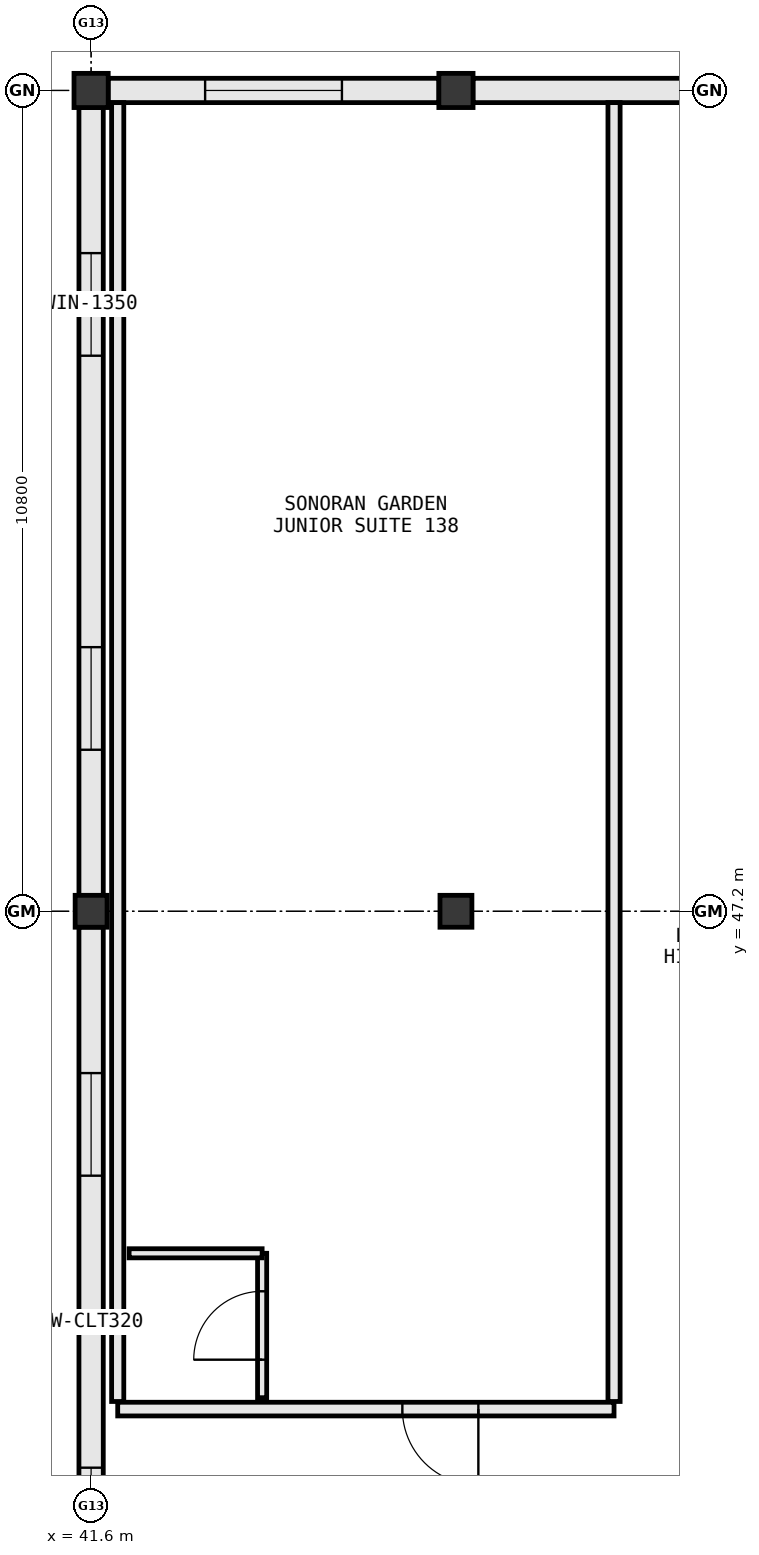
"""IFC4 building model, lengths in metres.
Left out: names, types, materials, properties, quantities, classifications, styles, units other than length and angle.
Written with IfcOpenShell. Run it as: python <this file> out.ifc"""

import sys

from ifc_helpers import new_model, si_unit, direction, frame, frame_2d, origin, origin_2d, place, context, subcontext, project, spatial, rectangle, extrude, element, fill, save


model = new_model("IFC4")
c1 = context("Model", 3, precision=1e-05, world=origin(), true_north=direction((0.0, 1.0)))
c2 = subcontext(c1, "Body", "Model", "MODEL_VIEW")
j1 = project(units=[si_unit("LENGTHUNIT", "METRE"), si_unit("PLANEANGLEUNIT", "RADIAN")], contexts=[c1])
p1 = place(None, origin())
s1 = spatial("IfcSite", under=j1, at=p1, CompositionType="ELEMENT")
p2 = place(p1, origin())
s2 = spatial("IfcBuilding", under=s1, at=p2, CompositionType="ELEMENT")
p3 = place(p2, frame((0.0, 0.0, 20.0)))
s3 = spatial("IfcBuildingStorey", under=s2, at=p3, CompositionType="ELEMENT", Elevation=20.0)
p4 = place(p3, frame((41.6, 58.0, 0.0), z_axis=(0.0, 0.0, 1.0), x_axis=(1.0, 0.0, 0.0)))
e1 = element("IfcColumn", 1, at=p4, inside=s3, PredefinedType="COLUMN", context=c2, shape_type="SweptSolid", body=[
    extrude(rectangle(XDim=0.45, YDim=0.45, at=origin_2d()), origin(), (0.0, 0.0, 1.0), 3.8),
])
for number, where, z_axis, x_axis in (
    (2, (41.6, 47.2, 0.0), (0.0, 0.0, 1.0), (1.0, 0.0, 0.0)),
    (3, (46.4, 47.2, 0.0), (0.0, 0.0, 1.0), (1.0, 0.0, 0.0)),
):
    element("IfcColumn", number, at=place(p3, frame(where, z_axis=z_axis, x_axis=x_axis)), inside=s3, PredefinedType="COLUMN", context=c2, shape_type="SweptSolid", body=[
        extrude(rectangle(XDim=0.42, YDim=0.42, at=origin_2d()), origin(), (0.0, 0.0, 1.0), 3.8),
    ])
p5 = place(p3, frame((46.4, 58.0, 0.0), z_axis=(0.0, 0.0, 1.0), x_axis=(1.0, 0.0, 0.0)))
e4 = element("IfcColumn", 4, at=p5, inside=s3, PredefinedType="COLUMN", context=c2, shape_type="SweptSolid", body=[
    extrude(rectangle(XDim=0.45, YDim=0.45, at=origin_2d()), origin(), (0.0, 0.0, 1.0), 3.8),
])
p6 = place(p3, frame((50.977, 58.0, 0.0), z_axis=(0.0, 0.0, 1.0), x_axis=(-1.0, 0.0, 0.0)))
e5 = element("IfcWall", 5, at=p6, inside=s3, PredefinedType="STANDARD", context=c2, shape_type="SweptSolid", body=[
    extrude(rectangle(XDim=4.354, YDim=0.32, at=frame_2d((2.177, 0.0))), origin(), (0.0, 0.0, 1.0), 2.865),
])
p7 = place(p3, frame((46.177, 58.0, 0.0), z_axis=(0.0, 0.0, 1.0), x_axis=(-1.0, 0.0, 0.0)))
e6 = element("IfcWall", 6, at=p7, inside=s3, PredefinedType="STANDARD", context=c2, shape_type="SweptSolid", body=[
    extrude(rectangle(XDim=4.354, YDim=0.32, at=frame_2d((2.177, 0.0))), origin(), (0.0, 0.0, 1.0), 2.865),
])
p8 = place(p7, frame((1.277, 0.0, 0.85)))
e7 = element("IfcOpeningElement", 7, at=p8, cuts=e6, PredefinedType="OPENING", context=c2, shape_type="SweptSolid", body=[
    extrude(rectangle(XDim=1.8, YDim=1.85, at=frame_2d((0.9, 0.925))), frame((0.0, 0.172, 0.0), z_axis=(0.0, -1.0, 0.0), x_axis=(1.0, 0.0, 0.0)), (0.0, 0.0, 1.0), 0.344),
])
p9 = place(p3, frame((41.6, 57.777, 0.0), z_axis=(0.0, 0.0, 1.0), x_axis=(0.0, -1.0, 0.0)))
e8 = element("IfcWall", 8, at=p9, inside=s3, PredefinedType="STANDARD", context=c2, shape_type="SweptSolid", body=[
    extrude(rectangle(XDim=10.369, YDim=0.32, at=frame_2d((5.185, 0.0))), origin(), (0.0, 0.0, 1.0), 2.905),
])
p10 = place(p9, frame((1.917, 0.0, 0.85)))
e9 = element("IfcOpeningElement", 9, at=p10, cuts=e8, PredefinedType="OPENING", context=c2, shape_type="SweptSolid", body=[
    extrude(rectangle(XDim=1.35, YDim=1.65, at=frame_2d((0.675, 0.825))), frame((0.0, 0.172, 0.0), z_axis=(0.0, -1.0, 0.0), x_axis=(1.0, 0.0, 0.0)), (0.0, 0.0, 1.0), 0.344),
])
p11 = place(p9, frame((7.102, 0.0, 0.85)))
e10 = element("IfcOpeningElement", 10, at=p11, cuts=e8, PredefinedType="OPENING", context=c2, shape_type="SweptSolid", body=[
    extrude(rectangle(XDim=1.35, YDim=1.65, at=frame_2d((0.675, 0.825))), frame((0.0, 0.172, 0.0), z_axis=(0.0, -1.0, 0.0), x_axis=(1.0, 0.0, 0.0)), (0.0, 0.0, 1.0), 0.344),
])
p12 = place(p3, frame((41.6, 46.992, 0.0), z_axis=(0.0, 0.0, 1.0), x_axis=(0.0, -1.0, 0.0)))
e11 = element("IfcWall", 11, at=p12, inside=s3, PredefinedType="STANDARD", context=c2, shape_type="SweptSolid", body=[
    extrude(rectangle(XDim=10.384, YDim=0.32, at=frame_2d((5.192, 0.0))), origin(), (0.0, 0.0, 1.0), 2.905),
])
p13 = place(p12, frame((1.921, 0.0, 0.85)))
e12 = element("IfcOpeningElement", 12, at=p13, cuts=e11, PredefinedType="OPENING", context=c2, shape_type="SweptSolid", body=[
    extrude(rectangle(XDim=1.35, YDim=1.65, at=frame_2d((0.675, 0.825))), frame((0.0, 0.172, 0.0), z_axis=(0.0, -1.0, 0.0), x_axis=(1.0, 0.0, 0.0)), (0.0, 0.0, 1.0), 0.344),
])
p14 = place(p12, frame((7.113, 0.0, 0.85)))
e13 = element("IfcOpeningElement", 13, at=p14, cuts=e11, PredefinedType="OPENING", context=c2, shape_type="SweptSolid", body=[
    extrude(rectangle(XDim=1.35, YDim=1.65, at=frame_2d((0.675, 0.825))), frame((0.0, 0.172, 0.0), z_axis=(0.0, -1.0, 0.0), x_axis=(1.0, 0.0, 0.0)), (0.0, 0.0, 1.0), 0.344),
])
p15 = place(p3, frame((41.95, 40.65, 0.0), z_axis=(0.0, 0.0, 1.0), x_axis=(1.0, 0.0, 0.0)))
e14 = element("IfcWall", 14, at=p15, inside=s3, PredefinedType="PARTITIONING", context=c2, shape_type="SweptSolid", body=[
    extrude(rectangle(XDim=6.53, YDim=0.18, at=frame_2d((3.265, 0.0))), origin(), (0.0, 0.0, 1.0), 3.55),
])
p16 = place(p15, frame((3.745, 0.0, 0.0)))
e15 = element("IfcOpeningElement", 15, at=p16, cuts=e14, PredefinedType="OPENING", context=c2, shape_type="SweptSolid", body=[
    extrude(rectangle(XDim=1.0, YDim=2.2, at=frame_2d((0.5, 1.1))), frame((0.0, 0.102, 0.0), z_axis=(0.0, -1.0, 0.0), x_axis=(1.0, 0.0, 0.0)), (0.0, 0.0, 1.0), 0.204),
])
p17 = place(p3, frame((41.95, 40.75, 0.0), z_axis=(0.0, 0.0, 1.0), x_axis=(0.0, 1.0, 0.0)))
e16 = element("IfcWall", 16, at=p17, inside=s3, PredefinedType="PARTITIONING", context=c2, shape_type="SweptSolid", body=[
    extrude(rectangle(XDim=17.09, YDim=0.16, at=frame_2d((8.545, 0.0))), origin(), (0.0, 0.0, 1.0), 2.905),
])
p18 = place(p3, frame((48.48, 40.75, 0.0), z_axis=(0.0, 0.0, 1.0), x_axis=(0.0, 1.0, 0.0)))
e17 = element("IfcWall", 17, at=p18, inside=s3, PredefinedType="PARTITIONING", context=c2, shape_type="SweptSolid", body=[
    extrude(rectangle(XDim=17.09, YDim=0.16, at=frame_2d((8.545, 0.0))), origin(), (0.0, 0.0, 1.0), 3.05),
])
p19 = place(p3, frame((43.85, 40.8, 0.0), z_axis=(0.0, 0.0, 1.0), x_axis=(0.0, 1.0, 0.0)))
e18 = element("IfcWall", 18, at=p19, inside=s3, PredefinedType="PARTITIONING", context=c2, shape_type="SweptSolid", body=[
    extrude(rectangle(XDim=1.9, YDim=0.12, at=frame_2d((0.95, 0.0))), origin(), (0.0, 0.0, 1.0), 3.05),
])
p20 = place(p19, frame((0.5, 0.0, 0.0)))
e19 = element("IfcOpeningElement", 19, at=p20, cuts=e18, PredefinedType="OPENING", context=c2, shape_type="SweptSolid", body=[
    extrude(rectangle(XDim=0.9, YDim=2.15, at=frame_2d((0.45, 1.075))), frame((0.0, 0.072, 0.0), z_axis=(0.0, -1.0, 0.0), x_axis=(1.0, 0.0, 0.0)), (0.0, 0.0, 1.0), 0.144),
])
p21 = place(p3, frame((42.1, 42.7, 0.0), z_axis=(0.0, 0.0, 1.0), x_axis=(1.0, 0.0, 0.0)))
e20 = element("IfcWall", 20, at=p21, inside=s3, PredefinedType="PARTITIONING", context=c2, shape_type="SweptSolid", body=[
    extrude(rectangle(XDim=1.75, YDim=0.12, at=frame_2d((0.875, 0.0))), origin(), (0.0, 0.0, 1.0), 3.55),
])
p22 = place(p8, origin())
e21 = element("IfcWindow", 21, at=p22, inside=s3, PartitioningType="SINGLE_PANEL", PredefinedType="WINDOW", context=c2, shape_type="SweptSolid", body=[
    extrude(rectangle(XDim=1.8, YDim=1.85, at=frame_2d((0.9, 0.925))), frame((0.0, 0.03, 0.0), z_axis=(0.0, -1.0, 0.0), x_axis=(1.0, 0.0, 0.0)), (0.0, 0.0, 1.0), 0.06),
])
fill(e7, e21)
p23 = place(p10, origin())
e22 = element("IfcWindow", 22, at=p23, inside=s3, PartitioningType="SINGLE_PANEL", PredefinedType="WINDOW", context=c2, shape_type="SweptSolid", body=[
    extrude(rectangle(XDim=1.35, YDim=1.65, at=frame_2d((0.675, 0.825))), frame((0.0, 0.03, 0.0), z_axis=(0.0, -1.0, 0.0), x_axis=(1.0, 0.0, 0.0)), (0.0, 0.0, 1.0), 0.06),
])
fill(e9, e22)
p24 = place(p11, origin())
e23 = element("IfcWindow", 23, at=p24, inside=s3, PartitioningType="SINGLE_PANEL", PredefinedType="WINDOW", context=c2, shape_type="SweptSolid", body=[
    extrude(rectangle(XDim=1.35, YDim=1.65, at=frame_2d((0.675, 0.825))), frame((0.0, 0.03, 0.0), z_axis=(0.0, -1.0, 0.0), x_axis=(1.0, 0.0, 0.0)), (0.0, 0.0, 1.0), 0.06),
])
fill(e10, e23)
p25 = place(p13, origin())
e24 = element("IfcWindow", 24, at=p25, inside=s3, PartitioningType="SINGLE_PANEL", PredefinedType="WINDOW", context=c2, shape_type="SweptSolid", body=[
    extrude(rectangle(XDim=1.35, YDim=1.65, at=frame_2d((0.675, 0.825))), frame((0.0, 0.03, 0.0), z_axis=(0.0, -1.0, 0.0), x_axis=(1.0, 0.0, 0.0)), (0.0, 0.0, 1.0), 0.06),
])
fill(e12, e24)
p26 = place(p14, origin())
e25 = element("IfcWindow", 25, at=p26, inside=s3, PartitioningType="SINGLE_PANEL", PredefinedType="WINDOW", context=c2, shape_type="SweptSolid", body=[
    extrude(rectangle(XDim=1.35, YDim=1.65, at=frame_2d((0.675, 0.825))), frame((0.0, 0.03, 0.0), z_axis=(0.0, -1.0, 0.0), x_axis=(1.0, 0.0, 0.0)), (0.0, 0.0, 1.0), 0.06),
])
fill(e13, e25)
p27 = place(p16, frame((1.0, 0.0, 0.0), z_axis=(0.0, 0.0, 1.0), x_axis=(-1.0, 0.0, 0.0)))
e26 = element("IfcDoor", 26, at=p27, inside=s3, OperationType="SINGLE_SWING_RIGHT", PredefinedType="DOOR", context=c2, shape_type="SweptSolid", body=[
    extrude(rectangle(XDim=1.0, YDim=2.2, at=frame_2d((0.5, 1.1))), frame((0.0, 0.025, 0.0), z_axis=(0.0, -1.0, 0.0), x_axis=(1.0, 0.0, 0.0)), (0.0, 0.0, 1.0), 0.05),
])
fill(e15, e26)
p28 = place(p20, origin())
e27 = element("IfcDoor", 27, at=p28, inside=s3, OperationType="SINGLE_SWING_LEFT", PredefinedType="DOOR", context=c2, shape_type="SweptSolid", body=[
    extrude(rectangle(XDim=0.9, YDim=2.15, at=frame_2d((0.45, 1.075))), frame((0.0, 0.025, 0.0), z_axis=(0.0, -1.0, 0.0), x_axis=(1.0, 0.0, 0.0)), (0.0, 0.0, 1.0), 0.05),
])
fill(e19, e27)
save(model, sys.argv[1])
